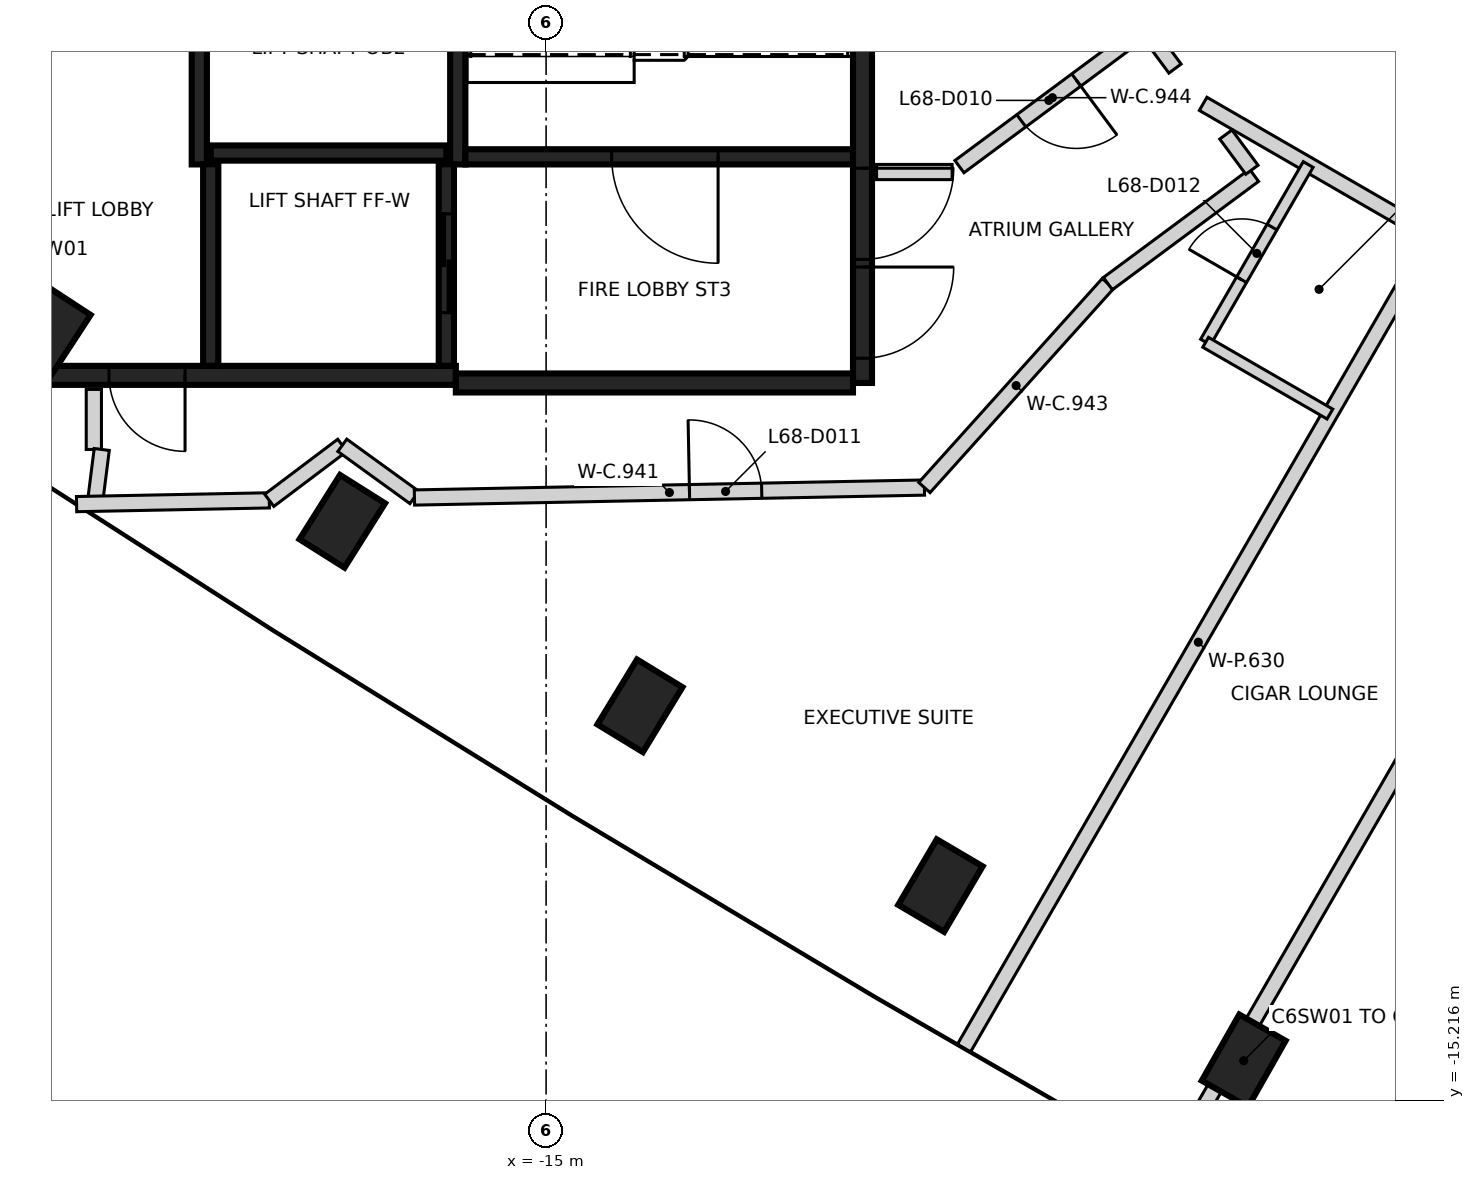
"""IFC4 building model, lengths in metres.
Left out: names, types, materials, properties, quantities, classifications, styles, units other than length and angle.
Written with IfcOpenShell. Run it as: python <this file> out.ifc"""

import sys

from ifc_helpers import new_model, si_unit, direction, frame, frame_2d, origin, origin_2d, place, context, subcontext, project, spatial, rectangle, extrude, element, fill, save


model = new_model("IFC4")
c1 = context("Model", 3, precision=1e-05, world=origin(), true_north=direction((0.0, 1.0)))
c2 = subcontext(c1, "Body", "Model", "MODEL_VIEW")
j1 = project(units=[si_unit("LENGTHUNIT", "METRE"), si_unit("PLANEANGLEUNIT", "RADIAN")], contexts=[c1])
p1 = place(None, origin())
s1 = spatial("IfcSite", under=j1, at=p1, CompositionType="ELEMENT")
p2 = place(p1, origin())
s2 = spatial("IfcBuilding", under=s1, at=p2, CompositionType="ELEMENT")
p3 = place(p2, frame((0.0, 0.0, 269.4)))
s3 = spatial("IfcBuildingStorey", under=s2, at=p3, CompositionType="ELEMENT", Elevation=269.4)
for number, where, z_axis, x_axis in (
    (1, (-21.559, -5.107, -0.35), (0.0, 0.0, 1.0), (0.547, 0.837, 0.0)),
    (2, (-17.681, -7.595, -0.35), (0.0, 0.0, 1.0), (0.533, 0.846, 0.0)),
    (3, (-13.765, -10.022, -0.35), (0.0, 0.0, 1.0), (0.52, 0.854, 0.0)),
    (4, (-9.812, -12.388, -0.35), (0.0, 0.0, 1.0), (0.507, 0.862, 0.0)),
    (5, (-5.822, -14.691, -0.35), (0.0, 0.0, 1.0), (0.493, 0.87, 0.0)),
):
    element("IfcColumn", number, at=place(p3, frame(where, z_axis=z_axis, x_axis=x_axis)), inside=s3, PredefinedType="COLUMN", context=c2, shape_type="SweptSolid", body=[
        extrude(rectangle(XDim=1.0, YDim=0.7, at=origin_2d()), origin(), (0.0, 0.0, 1.0), 3.6),
    ])
p4 = place(p3, frame((-10.837, 5.775, 0.0), z_axis=(0.0, 0.0, 1.0), x_axis=(0.0, -1.0, 0.0)))
e6 = element("IfcWall", 6, at=p4, inside=s3, PredefinedType="SHEAR", context=c2, shape_type="SweptSolid", body=[
    extrude(rectangle(XDim=11.55, YDim=0.25, at=frame_2d((5.775, 0.0))), origin(), (0.0, 0.0, 1.0), 3.25),
])
p5 = place(p4, frame((10.025, 0.0, 0.0)))
e7 = element("IfcOpeningElement", 7, at=p5, cuts=e6, PredefinedType="OPENING", context=c2, shape_type="SweptSolid", body=[
    extrude(rectangle(XDim=1.2, YDim=2.1, at=frame_2d((0.6, 1.05))), frame((0.0, 0.135, 0.0), z_axis=(0.0, -1.0, 0.0), x_axis=(1.0, 0.0, 0.0)), (0.0, 0.0, 1.0), 0.27),
])
p6 = place(p4, frame((8.725, 0.0, 0.0)))
e8 = element("IfcOpeningElement", 8, at=p6, cuts=e6, PredefinedType="OPENING", context=c2, shape_type="SweptSolid", body=[
    extrude(rectangle(XDim=1.2, YDim=2.1, at=frame_2d((0.6, 1.05))), frame((0.0, 0.135, 0.0), z_axis=(0.0, -1.0, 0.0), x_axis=(1.0, 0.0, 0.0)), (0.0, 0.0, 1.0), 0.27),
])
p7 = place(p3, frame((-16.187, -5.675, 0.0), z_axis=(0.0, 0.0, 1.0), x_axis=(-1.0, 0.0, 0.0)))
e9 = element("IfcWall", 9, at=p7, inside=s3, PredefinedType="SHEAR", context=c2, shape_type="SweptSolid", body=[
    extrude(rectangle(XDim=6.125, YDim=0.25, at=frame_2d((3.062, 0.0))), origin(), (0.0, 0.0, 1.0), 3.25),
])
p8 = place(p7, frame((3.563, 0.0, 0.0)))
e10 = element("IfcOpeningElement", 10, at=p8, cuts=e9, PredefinedType="OPENING", context=c2, shape_type="SweptSolid", body=[
    extrude(rectangle(XDim=1.0, YDim=2.1, at=frame_2d((0.5, 1.05))), frame((0.0, 0.135, 0.0), z_axis=(0.0, -1.0, 0.0), x_axis=(1.0, 0.0, 0.0)), (0.0, 0.0, 1.0), 0.27),
])
p9 = place(p3, frame((-10.963, -5.775, 0.0), z_axis=(0.0, 0.0, 1.0), x_axis=(-1.0, 0.0, 0.0)))
e11 = element("IfcWall", 11, at=p9, inside=s3, PredefinedType="SHEAR", context=c2, shape_type="SweptSolid", body=[
    extrude(rectangle(XDim=5.225, YDim=0.25, at=frame_2d((2.612, 0.0))), origin(), (0.0, 0.0, 1.0), 3.25),
])
p10 = place(p3, frame((-16.162, 3.074, 0.0), z_axis=(0.0, 0.0, 1.0), x_axis=(0.0, -1.0, 0.0)))
e12 = element("IfcWall", 12, at=p10, inside=s3, PredefinedType="SHEAR", context=c2, shape_type="SweptSolid", body=[
    extrude(rectangle(XDim=5.974, YDim=0.2, at=frame_2d((2.987, 0.0))), origin(), (0.0, 0.0, 1.0), 3.25),
])
p11 = place(p3, frame((-19.562, -2.9, 0.0), z_axis=(0.0, 0.0, 1.0), x_axis=(0.0, 1.0, 0.0)))
e13 = element("IfcWall", 13, at=p11, inside=s3, PredefinedType="SHEAR", context=c2, shape_type="SweptSolid", body=[
    extrude(rectangle(XDim=6.1, YDim=0.2, at=frame_2d((3.05, 0.0))), origin(), (0.0, 0.0, 1.0), 3.25),
])
p12 = place(p3, frame((-10.963, -2.8, 0.0), z_axis=(0.0, 0.0, 1.0), x_axis=(-1.0, 0.0, 0.0)))
e14 = element("IfcWall", 14, at=p12, inside=s3, PredefinedType="SHEAR", context=c2, shape_type="SweptSolid", body=[
    extrude(rectangle(XDim=5.098, YDim=0.2, at=frame_2d((2.549, 0.0))), origin(), (0.0, 0.0, 1.0), 3.25),
])
p13 = place(p12, frame((1.774, 0.0, 0.0)))
e15 = element("IfcOpeningElement", 15, at=p13, cuts=e14, PredefinedType="OPENING", context=c2, shape_type="SweptSolid", body=[
    extrude(rectangle(XDim=1.4, YDim=2.1, at=frame_2d((0.7, 1.05))), frame((0.0, 0.11, 0.0), z_axis=(0.0, -1.0, 0.0), x_axis=(1.0, 0.0, 0.0)), (0.0, 0.0, 1.0), 0.22),
])
p14 = place(p3, frame((-19.412, -2.75, 0.0), z_axis=(0.0, 0.0, 1.0), x_axis=(1.0, 0.0, 0.0)))
e16 = element("IfcWall", 16, at=p14, inside=s3, PredefinedType="SHEAR", context=c2, shape_type="SweptSolid", body=[
    extrude(rectangle(XDim=3.1, YDim=0.2, at=frame_2d((1.55, 0.0))), origin(), (0.0, 0.0, 1.0), 3.25),
])
p15 = place(p3, frame((-16.312, -2.898, 0.0), z_axis=(0.0, 0.0, 1.0), x_axis=(0.0, -1.0, 0.0)))
e17 = element("IfcWall", 17, at=p15, inside=s3, PredefinedType="SHEAR", context=c2, shape_type="SweptSolid", body=[
    extrude(rectangle(XDim=2.651, YDim=0.2, at=frame_2d((1.325, 0.0))), origin(), (0.0, 0.0, 1.0), 3.25),
])
p16 = place(p15, frame((0.652, 0.0, 0.0)))
e18 = element("IfcOpeningElement", 18, at=p16, cuts=e17, PredefinedType="OPENING", context=c2, shape_type="SweptSolid", body=[
    extrude(rectangle(XDim=1.3, YDim=2.1, at=frame_2d((0.65, 1.05))), frame((0.0, 0.11, 0.0), z_axis=(0.0, -1.0, 0.0), x_axis=(1.0, 0.0, 0.0)), (0.0, 0.0, 1.0), 0.22),
])
p17 = place(p3, frame((-19.412, -5.549, 0.0), z_axis=(0.0, 0.0, 1.0), x_axis=(0.0, 1.0, 0.0)))
e19 = element("IfcWall", 19, at=p17, inside=s3, PredefinedType="SHEAR", context=c2, shape_type="SweptSolid", body=[
    extrude(rectangle(XDim=2.651, YDim=0.2, at=frame_2d((1.325, 0.0))), origin(), (0.0, 0.0, 1.0), 3.25),
])
p18 = place(p3, frame((-20.95, -6.65, 0.0), z_axis=(0.0, 0.0, 1.0), x_axis=(0.0, 1.0, 0.0)))
e20 = element("IfcWall", 20, at=p18, inside=s3, PredefinedType="PARTITIONING", context=c2, shape_type="SweptSolid", body=[
    extrude(rectangle(XDim=0.79, YDim=0.2, at=frame_2d((0.395, 0.0))), origin(), (0.0, 0.0, 1.0), 3.25),
])
p19 = place(p3, frame((-20.929, -7.306, 0.0), z_axis=(0.0, 0.0, 1.0), x_axis=(0.125534186853, 0.992089294334, 0.0)))
e21 = element("IfcWall", 21, at=p19, inside=s3, PredefinedType="PARTITIONING", context=c2, shape_type="SweptSolid", body=[
    extrude(rectangle(XDim=0.661, YDim=0.2, at=frame_2d((0.331, 0.0))), origin(), (0.0, 0.0, 1.0), 3.25),
])
p20 = place(p3, frame((-21.177, -7.369, 0.0), z_axis=(0.0, 0.0, 1.0), x_axis=(0.999808930271, 0.019547453804, 0.0)))
e22 = element("IfcWall", 22, at=p20, inside=s3, PredefinedType="PARTITIONING", context=c2, shape_type="SweptSolid", body=[
    extrude(rectangle(XDim=2.535, YDim=0.2, at=frame_2d((1.268, 0.0))), origin(), (0.0, 0.0, 1.0), 3.25),
])
p21 = place(p3, frame((-18.642, -7.319, 0.0), z_axis=(0.0, 0.0, 1.0), x_axis=(0.798707882989, 0.601718968998, 0.0)))
e23 = element("IfcWall", 23, at=p21, inside=s3, PredefinedType="PARTITIONING", context=c2, shape_type="SweptSolid", body=[
    extrude(rectangle(XDim=1.203, YDim=0.2, at=frame_2d((0.602, 0.0))), origin(), (0.0, 0.0, 1.0), 2.35),
])
p22 = place(p3, frame((-17.681, -6.595, 0.0), z_axis=(0.0, 0.0, 1.0), x_axis=(0.810123213102, -0.586259652026, 0.0)))
e24 = element("IfcWall", 24, at=p22, inside=s3, PredefinedType="PARTITIONING", context=c2, shape_type="SweptSolid", body=[
    extrude(rectangle(XDim=1.17, YDim=0.2, at=frame_2d((0.585, 0.0))), origin(), (0.0, 0.0, 1.0), 3.25),
])
p23 = place(p3, frame((-16.732, -7.282, 0.0), z_axis=(0.0, 0.0, 1.0), x_axis=(0.999809119854, 0.019537754635, 0.0)))
e25 = element("IfcWall", 25, at=p23, inside=s3, PredefinedType="PARTITIONING", context=c2, shape_type="SweptSolid", body=[
    extrude(rectangle(XDim=6.71, YDim=0.2, at=frame_2d((3.355, 0.0))), origin(), (0.0, 0.0, 1.0), 3.25),
])
p24 = place(p23, frame((3.619, 0.0, 0.0)))
e26 = element("IfcOpeningElement", 26, at=p24, cuts=e25, PredefinedType="OPENING", context=c2, shape_type="SweptSolid", body=[
    extrude(rectangle(XDim=0.95, YDim=2.1, at=frame_2d((0.475, 1.05))), frame((0.0, 0.11, 0.0), z_axis=(0.0, -1.0, 0.0), x_axis=(1.0, 0.0, 0.0)), (0.0, 0.0, 1.0), 0.22),
])
p25 = place(p3, frame((-10.652, -3.0, 0.0), z_axis=(0.0, 0.0, 1.0), x_axis=(1.0, 0.0, 0.0)))
e27 = element("IfcWall", 27, at=p25, inside=s3, PredefinedType="PARTITIONING", context=c2, shape_type="SweptSolid", body=[
    extrude(rectangle(XDim=0.994, YDim=0.2, at=frame_2d((0.497, 0.0))), origin(), (0.0, 0.0, 1.0), 3.25),
])
p26 = place(p3, frame((-10.023, -7.151, 0.0), z_axis=(0.0, 0.0, 1.0), x_axis=(0.668886243279, 0.743364778256, 0.0)))
e28 = element("IfcWall", 28, at=p26, inside=s3, PredefinedType="PARTITIONING", context=c2, shape_type="SweptSolid", body=[
    extrude(rectangle(XDim=3.609, YDim=0.2, at=frame_2d((1.805, 0.0))), origin(), (0.0, 0.0, 1.0), 3.25),
])
p27 = place(p3, frame((-7.115, -1.115, 0.0), z_axis=(0.0, 0.0, 1.0), x_axis=(-0.803344165632, -0.595515030495, 0.0)))
e29 = element("IfcWall", 29, at=p27, inside=s3, PredefinedType="PARTITIONING", context=c2, shape_type="SweptSolid", body=[
    extrude(rectangle(XDim=3.046, YDim=0.2, at=frame_2d((1.523, 0.0))), origin(), (0.0, 0.0, 1.0), 3.25),
])
p28 = place(p27, frame((1.133, 0.0, 0.0)))
e30 = element("IfcOpeningElement", 30, at=p28, cuts=e29, PredefinedType="OPENING", context=c2, shape_type="SweptSolid", body=[
    extrude(rectangle(XDim=0.9, YDim=2.1, at=frame_2d((0.45, 1.05))), frame((0.0, 0.11, 0.0), z_axis=(0.0, -1.0, 0.0), x_axis=(1.0, 0.0, 0.0)), (0.0, 0.0, 1.0), 0.22),
])
p29 = place(p3, frame((-7.609, -4.468, 0.0), z_axis=(0.0, 0.0, 1.0), x_axis=(0.803414413351, 0.595420255298, 0.0)))
e31 = element("IfcWall", 31, at=p29, inside=s3, PredefinedType="PARTITIONING", context=c2, shape_type="SweptSolid", body=[
    extrude(rectangle(XDim=2.393, YDim=0.2, at=frame_2d((1.197, 0.0))), origin(), (0.0, 0.0, 1.0), 3.25),
])
p30 = place(p3, frame((-7.114, -1.115, 0.0), z_axis=(0.0, 0.0, 1.0), x_axis=(0.595075286625, -0.803669959155, 0.0)))
e32 = element("IfcWall", 32, at=p30, inside=s3, PredefinedType="PARTITIONING", context=c2, shape_type="SweptSolid", body=[
    extrude(rectangle(XDim=0.652, YDim=0.2, at=frame_2d((0.326, 0.0))), origin(), (0.0, 0.0, 1.0), 3.25),
])
p31 = place(p3, frame((-6.057, -2.507, 0.0), z_axis=(0.0, 0.0, 1.0), x_axis=(0.594974339713, -0.803744695213, 0.0)))
e33 = element("IfcWall", 33, at=p31, inside=s3, PredefinedType="PARTITIONING", context=c2, shape_type="SweptSolid", body=[
    extrude(rectangle(XDim=0.576, YDim=0.2, at=frame_2d((0.288, 0.0))), origin(), (0.0, 0.0, 1.0), 3.25),
])
p32 = place(p3, frame((-6.356, -2.103, 0.0), z_axis=(0.0, 0.0, 1.0), x_axis=(0.865939059902, -0.50014952218, 0.0)))
e34 = element("IfcWall", 34, at=p32, inside=s3, PredefinedType="PARTITIONING", context=c2, shape_type="SweptSolid", body=[
    extrude(rectangle(XDim=8.956, YDim=0.2, at=frame_2d((4.478, 0.0))), origin(), (0.0, 0.0, 1.0), 3.25),
])
p33 = place(p32, frame((4.546, 0.0, 0.0)))
e35 = element("IfcOpeningElement", 35, at=p33, cuts=e34, PredefinedType="OPENING", context=c2, shape_type="SweptSolid", body=[
    extrude(rectangle(XDim=1.0, YDim=2.1, at=frame_2d((0.5, 1.05))), frame((0.0, 0.11, 0.0), z_axis=(0.0, -1.0, 0.0), x_axis=(1.0, 0.0, 0.0)), (0.0, 0.0, 1.0), 0.22),
])
p34 = place(p32, frame((7.275, 0.0, 0.0)))
e36 = element("IfcOpeningElement", 36, at=p34, cuts=e34, PredefinedType="OPENING", context=c2, shape_type="SweptSolid", body=[
    extrude(rectangle(XDim=1.0, YDim=2.1, at=frame_2d((0.5, 1.05))), frame((0.0, 0.11, 0.0), z_axis=(0.0, -1.0, 0.0), x_axis=(1.0, 0.0, 0.0)), (0.0, 0.0, 1.0), 0.22),
])
p35 = place(p3, frame((-9.501, -14.524, 0.0), z_axis=(0.0, 0.0, 1.0), x_axis=(0.499964147476, 0.86604610226, 0.0)))
e37 = element("IfcWall", 37, at=p35, inside=s3, PredefinedType="PARTITIONING", context=c2, shape_type="SweptSolid", body=[
    extrude(rectangle(XDim=12.329, YDim=0.2, at=frame_2d((6.165, 0.0))), origin(), (0.0, 0.0, 1.0), 2.35),
])
p36 = place(p3, frame((-6.8, -16.084, 0.0), z_axis=(0.0, 0.0, 1.0), x_axis=(0.500002425662, 0.866024003323, 0.0)))
e38 = element("IfcWall", 38, at=p36, inside=s3, PredefinedType="PARTITIONING", context=c2, shape_type="SweptSolid", body=[
    extrude(rectangle(XDim=12.329, YDim=0.2, at=frame_2d((6.165, 0.0))), origin(), (0.0, 0.0, 1.0), 3.25),
])
p37 = place(p3, frame((-6.324, -5.237, 0.0), z_axis=(0.0, 0.0, 1.0), x_axis=(0.500294180644, 0.865855491877, 0.0)))
e39 = element("IfcWall", 39, at=p37, inside=s3, PredefinedType="PARTITIONING", context=c2, shape_type="SweptSolid", body=[
    extrude(rectangle(XDim=2.698, YDim=0.15, at=frame_2d((1.349, 0.0))), origin(), (0.0, 0.0, 1.0), 3.25),
])
p38 = place(p37, frame((0.948, 0.0, 0.0)))
e40 = element("IfcOpeningElement", 40, at=p38, cuts=e39, PredefinedType="OPENING", context=c2, shape_type="SweptSolid", body=[
    extrude(rectangle(XDim=0.8, YDim=2.1, at=frame_2d((0.4, 1.05))), frame((0.0, 0.085, 0.0), z_axis=(0.0, -1.0, 0.0), x_axis=(1.0, 0.0, 0.0)), (0.0, 0.0, 1.0), 0.17),
])
p39 = place(p3, frame((-6.323, -5.24, 0.0), z_axis=(0.0, 0.0, 1.0), x_axis=(0.865998231832, -0.50004706025, 0.0)))
e41 = element("IfcWall", 41, at=p39, inside=s3, PredefinedType="PARTITIONING", context=c2, shape_type="SweptSolid", body=[
    extrude(rectangle(XDim=1.888, YDim=0.15, at=frame_2d((0.944, 0.0))), origin(), (0.0, 0.0, 1.0), 3.25),
])
p40 = place(p16, origin())
e42 = element("IfcDoor", 42, at=p40, inside=s3, OperationType="SLIDING_TO_LEFT", PredefinedType="DOOR", context=c2, shape_type="SweptSolid", body=[
    extrude(rectangle(XDim=1.3, YDim=2.1, at=frame_2d((0.65, 1.05))), frame((0.0, 0.025, 0.0), z_axis=(0.0, -1.0, 0.0), x_axis=(1.0, 0.0, 0.0)), (0.0, 0.0, 1.0), 0.05),
])
fill(e18, e42)
p41 = place(p8, origin())
e43 = element("IfcDoor", 43, at=p41, inside=s3, OperationType="SINGLE_SWING_LEFT", PredefinedType="DOOR", context=c2, shape_type="SweptSolid", body=[
    extrude(rectangle(XDim=1.0, YDim=2.1, at=frame_2d((0.5, 1.05))), frame((0.0, 0.025, 0.0), z_axis=(0.0, -1.0, 0.0), x_axis=(1.0, 0.0, 0.0)), (0.0, 0.0, 1.0), 0.05),
])
fill(e10, e43)
p42 = place(p5, origin())
e44 = element("IfcDoor", 44, at=p42, inside=s3, OperationType="SINGLE_SWING_LEFT", PredefinedType="DOOR", context=c2, shape_type="SweptSolid", body=[
    extrude(rectangle(XDim=1.2, YDim=2.1, at=frame_2d((0.6, 1.05))), frame((0.0, 0.025, 0.0), z_axis=(0.0, -1.0, 0.0), x_axis=(1.0, 0.0, 0.0)), (0.0, 0.0, 1.0), 0.05),
])
fill(e7, e44)
p43 = place(p6, origin())
e45 = element("IfcDoor", 45, at=p43, inside=s3, OperationType="SINGLE_SWING_RIGHT", PredefinedType="DOOR", context=c2, shape_type="SweptSolid", body=[
    extrude(rectangle(XDim=1.2, YDim=2.1, at=frame_2d((0.6, 1.05))), frame((0.0, 0.025, 0.0), z_axis=(0.0, -1.0, 0.0), x_axis=(1.0, 0.0, 0.0)), (0.0, 0.0, 1.0), 0.05),
])
fill(e8, e45)
p44 = place(p13, origin())
e46 = element("IfcDoor", 46, at=p44, inside=s3, OperationType="SINGLE_SWING_LEFT", PredefinedType="DOOR", context=c2, shape_type="SweptSolid", body=[
    extrude(rectangle(XDim=1.4, YDim=2.1, at=frame_2d((0.7, 1.05))), frame((0.0, 0.025, 0.0), z_axis=(0.0, -1.0, 0.0), x_axis=(1.0, 0.0, 0.0)), (0.0, 0.0, 1.0), 0.05),
])
fill(e15, e46)
p45 = place(p28, origin())
e47 = element("IfcDoor", 47, at=p45, inside=s3, OperationType="SINGLE_SWING_LEFT", PredefinedType="DOOR", context=c2, shape_type="SweptSolid", body=[
    extrude(rectangle(XDim=0.9, YDim=2.1, at=frame_2d((0.45, 1.05))), frame((0.0, 0.025, 0.0), z_axis=(0.0, -1.0, 0.0), x_axis=(1.0, 0.0, 0.0)), (0.0, 0.0, 1.0), 0.05),
])
fill(e30, e47)
p46 = place(p24, frame((0.95, 0.0, 0.0), z_axis=(0.0, 0.0, 1.0), x_axis=(-1.0, 0.0, 0.0)))
e48 = element("IfcDoor", 48, at=p46, inside=s3, OperationType="SINGLE_SWING_LEFT", PredefinedType="DOOR", context=c2, shape_type="SweptSolid", body=[
    extrude(rectangle(XDim=0.95, YDim=2.1, at=frame_2d((0.475, 1.05))), frame((0.0, 0.025, 0.0), z_axis=(0.0, -1.0, 0.0), x_axis=(1.0, 0.0, 0.0)), (0.0, 0.0, 1.0), 0.05),
])
fill(e26, e48)
p47 = place(p38, origin())
e49 = element("IfcDoor", 49, at=p47, inside=s3, OperationType="SINGLE_SWING_LEFT", PredefinedType="DOOR", context=c2, shape_type="SweptSolid", body=[
    extrude(rectangle(XDim=0.8, YDim=2.1, at=frame_2d((0.4, 1.05))), frame((0.0, 0.025, 0.0), z_axis=(0.0, -1.0, 0.0), x_axis=(1.0, 0.0, 0.0)), (0.0, 0.0, 1.0), 0.05),
])
fill(e40, e49)
save(model, sys.argv[1])
